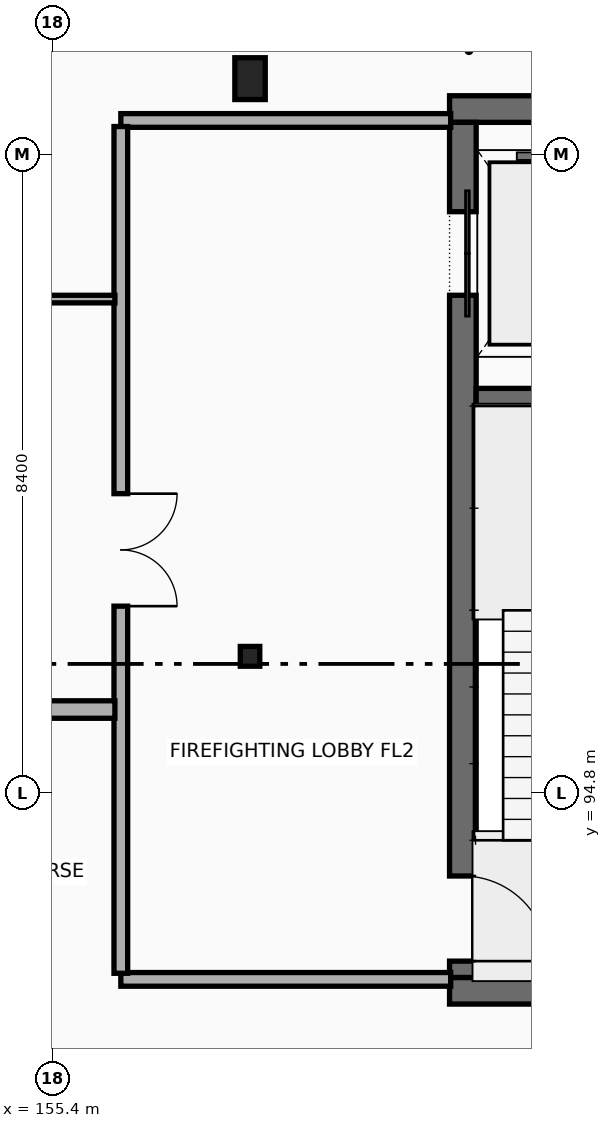
"""IFC4 building model, lengths in metres.
Left out: names, types, materials, properties, quantities, classifications, styles, units other than length and angle.
Written with IfcOpenShell. Run it as: python <this file> out.ifc"""

import sys

from ifc_helpers import new_model, si_unit, direction, frame, frame_2d, origin, origin_2d, place, context, subcontext, project, spatial, rectangle, i_section, extrude, element, fill, save


model = new_model("IFC4")
c1 = context("Model", 3, precision=1e-05, world=origin(), true_north=direction((0.0, 1.0)))
c2 = subcontext(c1, "Body", "Model", "MODEL_VIEW")
j1 = project(units=[si_unit("LENGTHUNIT", "METRE"), si_unit("PLANEANGLEUNIT", "RADIAN")], contexts=[c1])
p1 = place(None, origin())
s1 = spatial("IfcSite", under=j1, at=p1, CompositionType="ELEMENT")
p2 = place(p1, origin())
s2 = spatial("IfcBuilding", under=s1, at=p2, CompositionType="ELEMENT")
p3 = place(p2, frame((0.0, 0.0, 8.7)))
s3 = spatial("IfcBuildingStorey", under=s2, at=p3, CompositionType="ELEMENT", Elevation=8.7)
for number, where, z_axis, x_axis in (
    (1, (160.625, 92.2, 0.0), (0.0, 0.0, 1.0), (1.0, 0.0, 0.0)),
    (2, (165.375, 103.8, 0.0), (0.0, 0.0, 1.0), (-1.0, 0.0, 0.0)),
):
    element("IfcWall", number, at=place(p3, frame(where, z_axis=z_axis, x_axis=x_axis)), inside=s3, PredefinedType="SHEAR", context=c2, shape_type="SweptSolid", body=[
        extrude(rectangle(XDim=4.75, YDim=0.35, at=frame_2d((2.375, 0.0))), origin(), (0.0, 0.0, 1.0), 3.9),
    ])
p4 = place(p3, frame((160.8, 103.625, 0.0), z_axis=(0.0, 0.0, 1.0), x_axis=(0.0, -1.0, 0.0)))
e3 = element("IfcWall", 3, at=p4, inside=s3, PredefinedType="SHEAR", context=c2, shape_type="SweptSolid", body=[
    extrude(rectangle(XDim=11.25, YDim=0.35, at=frame_2d((5.625, 0.0))), origin(), (0.0, 0.0, 1.0), 3.9),
])
p5 = place(p4, frame((1.175, 0.0, 0.0)))
e4 = element("IfcOpeningElement", 4, at=p5, cuts=e3, PredefinedType="OPENING", context=c2, shape_type="SweptSolid", body=[
    extrude(rectangle(XDim=1.1, YDim=2.2, at=frame_2d((0.55, 1.1))), frame((0.0, 0.185, 0.0), z_axis=(0.0, -1.0, 0.0), x_axis=(1.0, 0.0, 0.0)), (0.0, 0.0, 1.0), 0.37),
])
p6 = place(p4, frame((9.915, 0.0, 0.0)))
e5 = element("IfcOpeningElement", 5, at=p6, cuts=e3, PredefinedType="OPENING", context=c2, shape_type="SweptSolid", body=[
    extrude(rectangle(XDim=1.12, YDim=2.16, at=frame_2d((0.56, 1.08))), frame((0.0, 0.185, 0.0), z_axis=(0.0, -1.0, 0.0), x_axis=(1.0, 0.0, 0.0)), (0.0, 0.0, 1.0), 0.37),
])
p7 = place(p3, frame((160.975, 100.0, 0.0), z_axis=(0.0, 0.0, 1.0), x_axis=(1.0, 0.0, 0.0)))
e6 = element("IfcWall", 6, at=p7, inside=s3, PredefinedType="SHEAR", context=c2, shape_type="SweptSolid", body=[
    extrude(rectangle(XDim=4.05, YDim=0.25, at=frame_2d((2.025, 0.0))), origin(), (0.0, 0.0, 1.0), 3.9),
])
p8 = place(p3, frame((158.0, 96.6, 0.0), z_axis=(0.0, 0.0, 1.0), x_axis=(1.0, 0.0, 0.0)))
e7 = element("IfcColumn", 7, at=p8, inside=s3, PredefinedType="COLUMN", context=c2, shape_type="SweptSolid", body=[
    extrude(i_section(OverallWidth=0.256, OverallDepth=0.26, WebThickness=0.01, FlangeThickness=0.017, at=origin_2d()), origin(), (0.0, 0.0, 1.0), 3.9),
])
p9 = place(p3, frame((158.0, 104.2, 0.0), z_axis=(0.0, 0.0, 1.0), x_axis=(1.0, 0.0, 0.0)))
e8 = element("IfcColumn", 8, at=p9, inside=s3, PredefinedType="COLUMN", context=c2, shape_type="SweptSolid", body=[
    extrude(rectangle(XDim=0.4, YDim=0.55, at=origin_2d()), origin(), (0.0, 0.0, 1.0), 3.9),
])
p10 = place(p3, frame((156.3, 92.35, 0.0), z_axis=(0.0, 0.0, 1.0), x_axis=(1.0, 0.0, 0.0)))
e9 = element("IfcWall", 9, at=p10, inside=s3, PredefinedType="PARTITIONING", context=c2, shape_type="SweptSolid", body=[
    extrude(rectangle(XDim=4.34, YDim=0.18, at=frame_2d((2.17, 0.0))), origin(), (0.0, 0.0, 1.0), 3.18),
])
p11 = place(p3, frame((160.64, 103.65, 0.0), z_axis=(0.0, 0.0, 1.0), x_axis=(-1.0, 0.0, 0.0)))
e10 = element("IfcWall", 10, at=p11, inside=s3, PredefinedType="PARTITIONING", context=c2, shape_type="SweptSolid", body=[
    extrude(rectangle(XDim=4.34, YDim=0.18, at=frame_2d((2.17, 0.0))), origin(), (0.0, 0.0, 1.0), 3.155),
])
p12 = place(p3, frame((156.3, 103.57, 0.0), z_axis=(0.0, 0.0, 1.0), x_axis=(0.0, -1.0, 0.0)))
e11 = element("IfcWall", 11, at=p12, inside=s3, PredefinedType="PARTITIONING", context=c2, shape_type="SweptSolid", body=[
    extrude(rectangle(XDim=11.14, YDim=0.18, at=frame_2d((5.57, 0.0))), origin(), (0.0, 0.0, 1.0), 3.18),
])
p13 = place(p12, frame((4.83, 0.0, 0.0)))
e12 = element("IfcOpeningElement", 12, at=p13, cuts=e11, PredefinedType="OPENING", context=c2, shape_type="SweptSolid", body=[
    extrude(rectangle(XDim=1.48, YDim=2.22, at=frame_2d((0.74, 1.11))), frame((0.0, 0.1, 0.0), z_axis=(0.0, -1.0, 0.0), x_axis=(1.0, 0.0, 0.0)), (0.0, 0.0, 1.0), 0.2),
])
p14 = place(p3, frame((138.458, 95.9, 0.0), z_axis=(0.0, 0.0, 1.0), x_axis=(1.0, 0.0, 0.0)))
e13 = element("IfcWall", 13, at=p14, inside=s3, PredefinedType="PARTITIONING", context=c2, shape_type="SweptSolid", body=[
    extrude(rectangle(XDim=17.764, YDim=0.23, at=frame_2d((8.882, 0.0))), origin(), (0.0, 0.0, 1.0), 3.022),
])
p15 = place(p3, frame((139.554, 101.3, 0.0), z_axis=(0.0, 0.0, 1.0), x_axis=(1.0, 0.0, 0.0)))
e14 = element("IfcWall", 14, at=p15, inside=s3, PredefinedType="PARTITIONING", context=c2, shape_type="SweptSolid", body=[
    extrude(rectangle(XDim=16.668, YDim=0.1, at=frame_2d((8.334, 0.0))), origin(), (0.0, 0.0, 1.0), 3.017),
])
p16 = place(p5, origin())
e15 = element("IfcDoor", 15, at=p16, inside=s3, OperationType="DOUBLE_DOOR_SLIDING", PredefinedType="DOOR", context=c2, shape_type="SweptSolid", body=[
    extrude(rectangle(XDim=1.1, YDim=2.2, at=frame_2d((0.55, 1.1))), frame((0.0, 0.025, 0.0), z_axis=(0.0, -1.0, 0.0), x_axis=(1.0, 0.0, 0.0)), (0.0, 0.0, 1.0), 0.05),
])
fill(e4, e15)
p17 = place(p6, origin())
e16 = element("IfcDoor", 16, at=p17, inside=s3, OperationType="SINGLE_SWING_RIGHT", PredefinedType="DOOR", context=c2, shape_type="SweptSolid", body=[
    extrude(rectangle(XDim=1.12, YDim=2.16, at=frame_2d((0.56, 1.08))), frame((0.0, 0.025, 0.0), z_axis=(0.0, -1.0, 0.0), x_axis=(1.0, 0.0, 0.0)), (0.0, 0.0, 1.0), 0.05),
])
fill(e5, e16)
p18 = place(p13, origin())
e17 = element("IfcDoor", 17, at=p18, inside=s3, OperationType="DOUBLE_DOOR_SINGLE_SWING", PredefinedType="DOOR", context=c2, shape_type="SweptSolid", body=[
    extrude(rectangle(XDim=1.48, YDim=2.22, at=frame_2d((0.74, 1.11))), frame((0.0, 0.025, 0.0), z_axis=(0.0, -1.0, 0.0), x_axis=(1.0, 0.0, 0.0)), (0.0, 0.0, 1.0), 0.05),
])
fill(e12, e17)
save(model, sys.argv[1])
